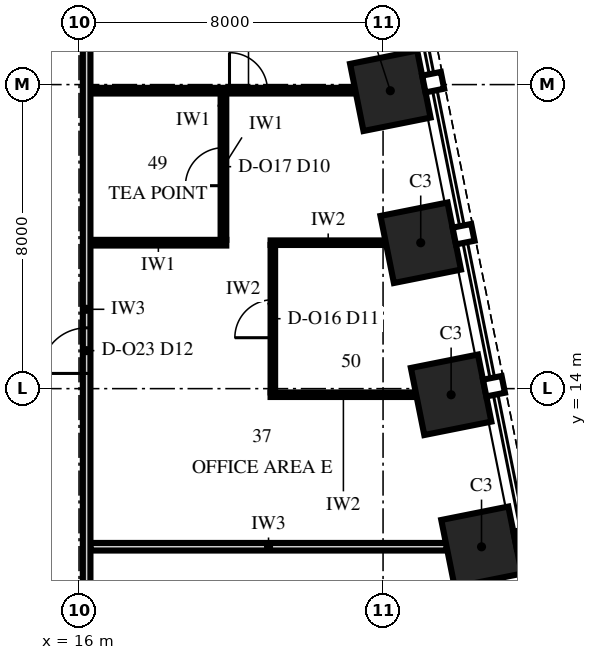
"""IFC4 building model, lengths in metres.
Left out: names, types, materials, properties, quantities, classifications, styles, units other than length and angle.
Written with IfcOpenShell. Run it as: python <this file> out.ifc"""

import sys

from ifc_helpers import new_model, si_unit, direction, frame, frame_2d, origin, origin_2d, place, context, subcontext, project, spatial, rectangle, extrude, element, fill, save


model = new_model("IFC4")
c1 = context("Model", 3, precision=1e-05, world=origin(), true_north=direction((0.0, 1.0)))
c2 = subcontext(c1, "Body", "Model", "MODEL_VIEW")
j1 = project(units=[si_unit("LENGTHUNIT", "METRE"), si_unit("PLANEANGLEUNIT", "RADIAN")], contexts=[c1])
p1 = place(None, origin())
s1 = spatial("IfcSite", under=j1, at=p1, CompositionType="ELEMENT")
p2 = place(p1, origin())
s2 = spatial("IfcBuilding", under=s1, at=p2, CompositionType="ELEMENT")
p3 = place(p2, frame((0.0, 0.0, 151.0)))
s3 = spatial("IfcBuildingStorey", under=s2, at=p3, CompositionType="ELEMENT", Elevation=151.0)
for number, where, z_axis, x_axis in (
    (1, (26.591, 9.838, 0.0), (0.0, 0.0, 1.0), (-0.196, 0.981, 0.0)),
    (2, (25.791, 13.838, 0.0), (0.0, 0.0, 1.0), (-0.196, 0.981, 0.0)),
    (3, (24.991, 17.838, 0.0), (0.0, 0.0, 1.0), (-0.196, 0.981, 0.0)),
    (4, (24.191, 21.838, 0.0), (0.0, 0.0, 1.0), (-0.196, 0.981, 0.0)),
):
    element("IfcColumn", number, at=place(p3, frame(where, z_axis=z_axis, x_axis=x_axis)), inside=s3, PredefinedType="COLUMN", context=c2, shape_type="SweptSolid", body=[
        extrude(rectangle(XDim=1.8, YDim=1.8, at=origin_2d()), origin(), (0.0, 0.0, 1.0), 4.0),
    ])
p4 = place(p3, frame((16.3, 9.84, 0.0), z_axis=(0.0, 0.0, 1.0), x_axis=(1.0, 0.0, 0.0)))
e5 = element("IfcWall", 5, at=p4, inside=s3, PredefinedType="PARTITIONING", context=c2, shape_type="SweptSolid", body=[
    extrude(rectangle(XDim=9.373, YDim=0.2, at=frame_2d((4.687, 0.0))), origin(), (0.0, 0.0, 1.0), 3.25),
])
p5 = place(p3, frame((21.04, 13.84, 0.0), z_axis=(0.0, 0.0, 1.0), x_axis=(1.0, 0.0, 0.0)))
e6 = element("IfcWall", 6, at=p5, inside=s3, PredefinedType="PARTITIONING", context=c2, shape_type="SweptSolid", body=[
    extrude(rectangle(XDim=3.833, YDim=0.12, at=frame_2d((1.917, 0.0))), origin(), (0.0, 0.0, 1.0), 3.25),
])
p6 = place(p3, frame((16.3, 17.84, 0.0), z_axis=(0.0, 0.0, 1.0), x_axis=(1.0, 0.0, 0.0)))
e7 = element("IfcWall", 7, at=p6, inside=s3, PredefinedType="PARTITIONING", context=c2, shape_type="SweptSolid", body=[
    extrude(rectangle(XDim=3.575, YDim=0.15, at=frame_2d((1.788, 0.0))), origin(), (0.0, 0.0, 1.0), 3.25),
])
p7 = place(p3, frame((21.04, 17.84, 0.0), z_axis=(0.0, 0.0, 1.0), x_axis=(1.0, 0.0, 0.0)))
e8 = element("IfcWall", 8, at=p7, inside=s3, PredefinedType="PARTITIONING", context=c2, shape_type="SweptSolid", body=[
    extrude(rectangle(XDim=3.033, YDim=0.12, at=frame_2d((1.516, 0.0))), origin(), (0.0, 0.0, 1.0), 3.25),
])
p8 = place(p3, frame((16.3, 21.84, 0.0), z_axis=(0.0, 0.0, 1.0), x_axis=(1.0, 0.0, 0.0)))
e9 = element("IfcWall", 9, at=p8, inside=s3, PredefinedType="PARTITIONING", context=c2, shape_type="SweptSolid", body=[
    extrude(rectangle(XDim=6.973, YDim=0.15, at=frame_2d((3.486, 0.0))), origin(), (0.0, 0.0, 1.0), 3.25),
])
p9 = place(p8, frame((3.659, 0.0, 0.0)))
e10 = element("IfcOpeningElement", 10, at=p9, cuts=e9, PredefinedType="OPENING", context=c2, shape_type="SweptSolid", body=[
    extrude(rectangle(XDim=1.0, YDim=2.3, at=frame_2d((0.5, 1.15))), frame((0.0, 0.09, 0.0), z_axis=(0.0, -1.0, 0.0), x_axis=(1.0, 0.0, 0.0)), (0.0, 0.0, 1.0), 0.18),
])
p10 = place(p3, frame((16.2, 3.9, 0.0), z_axis=(0.0, 0.0, 1.0), x_axis=(0.0, 1.0, 0.0)))
e11 = element("IfcWall", 11, at=p10, inside=s3, PredefinedType="PARTITIONING", context=c2, shape_type="SweptSolid", body=[
    extrude(rectangle(XDim=24.375, YDim=0.2, at=frame_2d((12.188, 0.0))), origin(), (0.0, 0.0, 1.0), 2.842),
])
p11 = place(p10, frame((3.1, 0.0, 0.0)))
e12 = element("IfcOpeningElement", 12, at=p11, cuts=e11, PredefinedType="OPENING", context=c2, shape_type="SweptSolid", body=[
    extrude(rectangle(XDim=1.2, YDim=2.4, at=frame_2d((0.6, 1.2))), frame((0.0, 0.115, 0.0), z_axis=(0.0, -1.0, 0.0), x_axis=(1.0, 0.0, 0.0)), (0.0, 0.0, 1.0), 0.23),
])
p12 = place(p10, frame((10.5, 0.0, 0.0)))
e13 = element("IfcOpeningElement", 13, at=p12, cuts=e11, PredefinedType="OPENING", context=c2, shape_type="SweptSolid", body=[
    extrude(rectangle(XDim=1.2, YDim=2.4, at=frame_2d((0.6, 1.2))), frame((0.0, 0.115, 0.0), z_axis=(0.0, -1.0, 0.0), x_axis=(1.0, 0.0, 0.0)), (0.0, 0.0, 1.0), 0.23),
])
p13 = place(p3, frame((19.8, 17.915, 0.0), z_axis=(0.0, 0.0, 1.0), x_axis=(0.0, 1.0, 0.0)))
e14 = element("IfcWall", 14, at=p13, inside=s3, PredefinedType="PARTITIONING", context=c2, shape_type="SweptSolid", body=[
    extrude(rectangle(XDim=3.85, YDim=0.15, at=frame_2d((1.925, 0.0))), origin(), (0.0, 0.0, 1.0), 3.25),
])
p14 = place(p13, frame((1.425, 0.0, 0.0)))
e15 = element("IfcOpeningElement", 15, at=p14, cuts=e14, PredefinedType="OPENING", context=c2, shape_type="SweptSolid", body=[
    extrude(rectangle(XDim=1.0, YDim=2.3, at=frame_2d((0.5, 1.15))), frame((0.0, 0.09, 0.0), z_axis=(0.0, -1.0, 0.0), x_axis=(1.0, 0.0, 0.0)), (0.0, 0.0, 1.0), 0.18),
])
p15 = place(p3, frame((21.1, 13.9, 0.0), z_axis=(0.0, 0.0, 1.0), x_axis=(0.0, 1.0, 0.0)))
e16 = element("IfcWall", 16, at=p15, inside=s3, PredefinedType="PARTITIONING", context=c2, shape_type="SweptSolid", body=[
    extrude(rectangle(XDim=3.88, YDim=0.12, at=frame_2d((1.94, 0.0))), origin(), (0.0, 0.0, 1.0), 3.25),
])
p16 = place(p15, frame((1.44, 0.0, 0.0)))
e17 = element("IfcOpeningElement", 17, at=p16, cuts=e16, PredefinedType="OPENING", context=c2, shape_type="SweptSolid", body=[
    extrude(rectangle(XDim=1.0, YDim=2.4, at=frame_2d((0.5, 1.2))), frame((0.0, 0.075, 0.0), z_axis=(0.0, -1.0, 0.0), x_axis=(1.0, 0.0, 0.0)), (0.0, 0.0, 1.0), 0.15),
])
p17 = place(p16, origin())
e18 = element("IfcDoor", 18, at=p17, inside=s3, OperationType="SINGLE_SWING_RIGHT", PredefinedType="DOOR", context=c2, shape_type="SweptSolid", body=[
    extrude(rectangle(XDim=1.0, YDim=2.4, at=frame_2d((0.5, 1.2))), frame((0.0, 0.06, 0.0), z_axis=(0.0, -1.0, 0.0), x_axis=(1.0, 0.0, 0.0)), (0.0, 0.0, 1.0), 0.12),
])
fill(e17, e18)
p18 = place(p14, origin())
e19 = element("IfcDoor", 19, at=p18, inside=s3, OperationType="SINGLE_SWING_LEFT", PredefinedType="DOOR", context=c2, shape_type="SweptSolid", body=[
    extrude(rectangle(XDim=1.0, YDim=2.3, at=frame_2d((0.5, 1.15))), frame((0.0, 0.075, 0.0), z_axis=(0.0, -1.0, 0.0), x_axis=(1.0, 0.0, 0.0)), (0.0, 0.0, 1.0), 0.149),
])
fill(e15, e19)
p19 = place(p9, origin())
e20 = element("IfcDoor", 20, at=p19, inside=s3, OperationType="SINGLE_SWING_LEFT", PredefinedType="DOOR", context=c2, shape_type="SweptSolid", body=[
    extrude(rectangle(XDim=1.0, YDim=2.3, at=frame_2d((0.5, 1.15))), frame((0.0, 0.075, 0.0), z_axis=(0.0, -1.0, 0.0), x_axis=(1.0, 0.0, 0.0)), (0.0, 0.0, 1.0), 0.149),
])
fill(e10, e20)
p20 = place(p12, origin())
e21 = element("IfcDoor", 21, at=p20, inside=s3, OperationType="SINGLE_SWING_LEFT", PredefinedType="DOOR", context=c2, shape_type="SweptSolid", body=[
    extrude(rectangle(XDim=1.2, YDim=2.4, at=frame_2d((0.6, 1.2))), frame((0.0, 0.1, 0.0), z_axis=(0.0, -1.0, 0.0), x_axis=(1.0, 0.0, 0.0)), (0.0, 0.0, 1.0), 0.199),
])
fill(e13, e21)
save(model, sys.argv[1])
